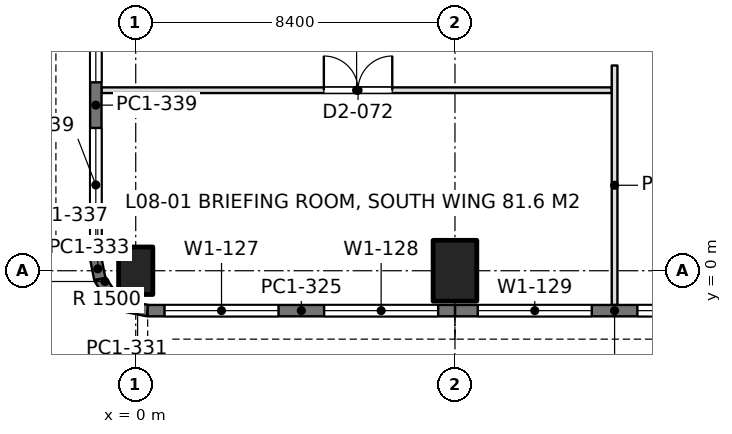
"""IFC4 building model, lengths in metres.
Left out: names, types, materials, properties, quantities, classifications, styles, units other than length and angle.
Written with IfcOpenShell. Run it as: python <this file> out.ifc"""

import sys

from ifc_helpers import new_model, si_unit, direction, frame, frame_2d, origin, origin_with_axes, origin_2d, place, context, subcontext, project, spatial, rectangle, extrude, element, fill, save


model = new_model("IFC4")
c1 = context("Model", 3, precision=1e-05, world=origin(), true_north=direction((0.0, 1.0)))
c2 = subcontext(c1, "Body", "Model", "MODEL_VIEW")
j1 = project(units=[si_unit("LENGTHUNIT", "METRE"), si_unit("PLANEANGLEUNIT", "RADIAN")], contexts=[c1])
p1 = place(None, origin())
s1 = spatial("IfcSite", under=j1, at=p1, CompositionType="ELEMENT")
p2 = place(p1, origin())
s2 = spatial("IfcBuilding", under=s1, at=p2, CompositionType="ELEMENT")
p3 = place(p2, frame((0.0, 0.0, 36.9)))
s3 = spatial("IfcBuildingStorey", under=s2, at=p3, CompositionType="ELEMENT", Elevation=36.9)
p4 = place(p3, origin_with_axes())
e1 = element("IfcColumn", 1, at=p4, inside=s3, PredefinedType="COLUMN", context=c2, shape_type="SweptSolid", body=[
    extrude(rectangle(XDim=0.9, YDim=1.25, at=origin_2d()), origin(), (0.0, 0.0, 1.0), 4.5),
])
p5 = place(p3, frame((8.4, 0.0, 0.0), z_axis=(0.0, 0.0, 1.0), x_axis=(1.0, 0.0, 0.0)))
e2 = element("IfcColumn", 2, at=p5, inside=s3, PredefinedType="COLUMN", context=c2, shape_type="SweptSolid", body=[
    extrude(rectangle(XDim=1.15, YDim=1.6, at=origin_2d()), origin(), (0.0, 0.0, 1.0), 4.5),
])
p6 = place(p3, frame((16.8, -1.05, 0.0), z_axis=(0.0, 0.0, 1.0), x_axis=(-1.0, 0.0, 0.0)))
e3 = element("IfcWall", 3, at=p6, inside=s3, PredefinedType="SOLIDWALL", context=c2, shape_type="SweptSolid", body=[
    extrude(rectangle(XDim=8.4, YDim=0.3, at=frame_2d((4.2, 0.0))), origin(), (0.0, 0.0, 1.0), 4.34),
])
p7 = place(p6, frame((0.6, 0.0, 0.9)))
e4 = element("IfcOpeningElement", 4, at=p7, cuts=e3, PredefinedType="OPENING", context=c2, shape_type="SweptSolid", body=[
    extrude(rectangle(XDim=3.0, YDim=1.9, at=frame_2d((1.5, 0.95))), frame((0.0, 0.16, 0.0), z_axis=(0.0, -1.0, 0.0), x_axis=(1.0, 0.0, 0.0)), (0.0, 0.0, 1.0), 0.32),
])
p8 = place(p6, frame((4.8, 0.0, 0.9)))
e5 = element("IfcOpeningElement", 5, at=p8, cuts=e3, PredefinedType="OPENING", context=c2, shape_type="SweptSolid", body=[
    extrude(rectangle(XDim=3.0, YDim=1.9, at=frame_2d((1.5, 0.95))), frame((0.0, 0.16, 0.0), z_axis=(0.0, -1.0, 0.0), x_axis=(1.0, 0.0, 0.0)), (0.0, 0.0, 1.0), 0.32),
])
p9 = place(p3, frame((8.4, -1.05, 0.0), z_axis=(0.0, 0.0, 1.0), x_axis=(-1.0, 0.0, 0.0)))
e6 = element("IfcWall", 6, at=p9, inside=s3, PredefinedType="SOLIDWALL", context=c2, shape_type="SweptSolid", body=[
    extrude(rectangle(XDim=8.085, YDim=0.3, at=frame_2d((4.042, 0.0))), origin(), (0.0, 0.0, 1.0), 4.34),
])
p10 = place(p9, frame((0.443, 0.0, 0.9)))
e7 = element("IfcOpeningElement", 7, at=p10, cuts=e6, PredefinedType="OPENING", context=c2, shape_type="SweptSolid", body=[
    extrude(rectangle(XDim=3.0, YDim=1.9, at=frame_2d((1.5, 0.95))), frame((0.0, 0.16, 0.0), z_axis=(0.0, -1.0, 0.0), x_axis=(1.0, 0.0, 0.0)), (0.0, 0.0, 1.0), 0.32),
])
p11 = place(p9, frame((4.643, 0.0, 0.9)))
e8 = element("IfcOpeningElement", 8, at=p11, cuts=e6, PredefinedType="OPENING", context=c2, shape_type="SweptSolid", body=[
    extrude(rectangle(XDim=3.0, YDim=1.9, at=frame_2d((1.5, 0.95))), frame((0.0, 0.16, 0.0), z_axis=(0.0, -1.0, 0.0), x_axis=(1.0, 0.0, 0.0)), (0.0, 0.0, 1.0), 0.32),
])
p12 = place(p3, frame((0.315, -1.05, 0.0), z_axis=(0.0, 0.0, 1.0), x_axis=(-0.980788534345, 0.195073962632, 0.0)))
e9 = element("IfcWall", 9, at=p12, inside=s3, PredefinedType="SOLIDWALL", context=c2, shape_type="SweptSolid", body=[
    extrude(rectangle(XDim=0.541, YDim=0.3, at=frame_2d((0.271, 0.0))), origin(), (0.0, 0.0, 1.0), 4.34),
])
for number, where, z_axis, x_axis in (
    (10, (-0.216, -0.945, 0.0), (0.0, 0.0, 1.0), (-0.831, 0.556, 0.0)),
    (11, (-0.653, -0.653, 0.0), (0.0, 0.0, 1.0), (-0.556, 0.831, 0.0)),
):
    element("IfcWall", number, at=place(p3, frame(where, z_axis=z_axis, x_axis=x_axis)), inside=s3, PredefinedType="SOLIDWALL", context=c2, shape_type="SweptSolid", body=[
        extrude(rectangle(XDim=0.526, YDim=0.3, at=frame_2d((0.263, 0.0))), origin(), (0.0, 0.0, 1.0), 4.34),
    ])
p13 = place(p3, frame((-0.945, -0.216, 0.0), z_axis=(0.0, 0.0, 1.0), x_axis=(-0.195073962632, 0.980788534345, 0.0)))
e12 = element("IfcWall", 12, at=p13, inside=s3, PredefinedType="SOLIDWALL", context=c2, shape_type="SweptSolid", body=[
    extrude(rectangle(XDim=0.541, YDim=0.3, at=frame_2d((0.271, 0.0))), origin(), (0.0, 0.0, 1.0), 4.34),
])
p14 = place(p3, frame((-1.05, 0.315, 0.0), z_axis=(0.0, 0.0, 1.0), x_axis=(0.0, 1.0, 0.0)))
e13 = element("IfcWall", 13, at=p14, inside=s3, PredefinedType="SOLIDWALL", context=c2, shape_type="SweptSolid", body=[
    extrude(rectangle(XDim=8.085, YDim=0.3, at=frame_2d((4.042, 0.0))), origin(), (0.0, 0.0, 1.0), 4.34),
])
p15 = place(p14, frame((0.443, 0.0, 0.9)))
e14 = element("IfcOpeningElement", 14, at=p15, cuts=e13, PredefinedType="OPENING", context=c2, shape_type="SweptSolid", body=[
    extrude(rectangle(XDim=3.0, YDim=1.9, at=frame_2d((1.5, 0.95))), frame((0.0, 0.16, 0.0), z_axis=(0.0, -1.0, 0.0), x_axis=(1.0, 0.0, 0.0)), (0.0, 0.0, 1.0), 0.32),
])
p16 = place(p14, frame((4.643, 0.0, 0.9)))
e15 = element("IfcOpeningElement", 15, at=p16, cuts=e13, PredefinedType="OPENING", context=c2, shape_type="SweptSolid", body=[
    extrude(rectangle(XDim=3.0, YDim=1.9, at=frame_2d((1.5, 0.95))), frame((0.0, 0.16, 0.0), z_axis=(0.0, -1.0, 0.0), x_axis=(1.0, 0.0, 0.0)), (0.0, 0.0, 1.0), 0.32),
])
p17 = place(p3, frame((-0.902, 4.75, 0.0), z_axis=(0.0, 0.0, 1.0), x_axis=(1.0, 0.0, 0.0)))
e16 = element("IfcWall", 16, at=p17, inside=s3, PredefinedType="PARTITIONING", context=c2, shape_type="SweptSolid", body=[
    extrude(rectangle(XDim=13.428, YDim=0.15, at=frame_2d((6.714, 0.0))), origin(), (0.0, 0.0, 1.0), 3.74),
])
p18 = place(p17, frame((5.852, 0.0, 0.0)))
e17 = element("IfcOpeningElement", 17, at=p18, cuts=e16, PredefinedType="OPENING", context=c2, shape_type="SweptSolid", body=[
    extrude(rectangle(XDim=1.8, YDim=2.2, at=frame_2d((0.9, 1.1))), frame((0.0, 0.085, 0.0), z_axis=(0.0, -1.0, 0.0), x_axis=(1.0, 0.0, 0.0)), (0.0, 0.0, 1.0), 0.17),
])
p19 = place(p3, frame((12.6, -0.902, 0.0), z_axis=(0.0, 0.0, 1.0), x_axis=(0.0, 1.0, 0.0)))
e18 = element("IfcWall", 18, at=p19, inside=s3, PredefinedType="PARTITIONING", context=c2, shape_type="SweptSolid", body=[
    extrude(rectangle(XDim=6.302, YDim=0.15, at=frame_2d((3.151, 0.0))), origin(), (0.0, 0.0, 1.0), 3.84),
])
p20 = place(p7, origin())
e19 = element("IfcWindow", 19, at=p20, inside=s3, PartitioningType="SINGLE_PANEL", PredefinedType="WINDOW", context=c2, shape_type="SweptSolid", body=[
    extrude(rectangle(XDim=3.0, YDim=1.9, at=frame_2d((1.5, 0.95))), frame((0.0, 0.03, 0.0), z_axis=(0.0, -1.0, 0.0), x_axis=(1.0, 0.0, 0.0)), (0.0, 0.0, 1.0), 0.06),
])
fill(e4, e19)
p21 = place(p8, origin())
e20 = element("IfcWindow", 20, at=p21, inside=s3, PartitioningType="SINGLE_PANEL", PredefinedType="WINDOW", context=c2, shape_type="SweptSolid", body=[
    extrude(rectangle(XDim=3.0, YDim=1.9, at=frame_2d((1.5, 0.95))), frame((0.0, 0.03, 0.0), z_axis=(0.0, -1.0, 0.0), x_axis=(1.0, 0.0, 0.0)), (0.0, 0.0, 1.0), 0.06),
])
fill(e5, e20)
p22 = place(p10, origin())
e21 = element("IfcWindow", 21, at=p22, inside=s3, PartitioningType="SINGLE_PANEL", PredefinedType="WINDOW", context=c2, shape_type="SweptSolid", body=[
    extrude(rectangle(XDim=3.0, YDim=1.9, at=frame_2d((1.5, 0.95))), frame((0.0, 0.03, 0.0), z_axis=(0.0, -1.0, 0.0), x_axis=(1.0, 0.0, 0.0)), (0.0, 0.0, 1.0), 0.06),
])
fill(e7, e21)
p23 = place(p11, origin())
e22 = element("IfcWindow", 22, at=p23, inside=s3, PartitioningType="SINGLE_PANEL", PredefinedType="WINDOW", context=c2, shape_type="SweptSolid", body=[
    extrude(rectangle(XDim=3.0, YDim=1.9, at=frame_2d((1.5, 0.95))), frame((0.0, 0.03, 0.0), z_axis=(0.0, -1.0, 0.0), x_axis=(1.0, 0.0, 0.0)), (0.0, 0.0, 1.0), 0.06),
])
fill(e8, e22)
p24 = place(p15, origin())
e23 = element("IfcWindow", 23, at=p24, inside=s3, PartitioningType="SINGLE_PANEL", PredefinedType="WINDOW", context=c2, shape_type="SweptSolid", body=[
    extrude(rectangle(XDim=3.0, YDim=1.9, at=frame_2d((1.5, 0.95))), frame((0.0, 0.03, 0.0), z_axis=(0.0, -1.0, 0.0), x_axis=(1.0, 0.0, 0.0)), (0.0, 0.0, 1.0), 0.06),
])
fill(e14, e23)
p25 = place(p16, origin())
e24 = element("IfcWindow", 24, at=p25, inside=s3, PartitioningType="SINGLE_PANEL", PredefinedType="WINDOW", context=c2, shape_type="SweptSolid", body=[
    extrude(rectangle(XDim=3.0, YDim=1.9, at=frame_2d((1.5, 0.95))), frame((0.0, 0.03, 0.0), z_axis=(0.0, -1.0, 0.0), x_axis=(1.0, 0.0, 0.0)), (0.0, 0.0, 1.0), 0.06),
])
fill(e15, e24)
p26 = place(p18, origin())
e25 = element("IfcDoor", 25, at=p26, inside=s3, OperationType="DOUBLE_DOOR_SINGLE_SWING", PredefinedType="DOOR", context=c2, shape_type="SweptSolid", body=[
    extrude(rectangle(XDim=1.8, YDim=2.2, at=frame_2d((0.9, 1.1))), frame((0.0, 0.025, 0.0), z_axis=(0.0, -1.0, 0.0), x_axis=(1.0, 0.0, 0.0)), (0.0, 0.0, 1.0), 0.05),
])
fill(e17, e25)
save(model, sys.argv[1])
